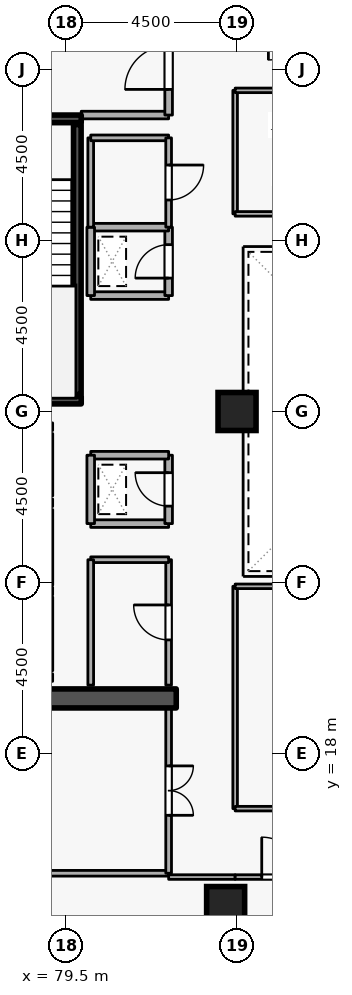
"""IFC4 building model, lengths in metres.
Left out: names, types, materials, properties, quantities, classifications, styles, units other than length and angle.
Written with IfcOpenShell. Run it as: python <this file> out.ifc"""

import sys

from ifc_helpers import new_model, si_unit, direction, frame, frame_2d, origin, origin_2d, place, context, subcontext, project, spatial, rectangle, extrude, element, fill, save


model = new_model("IFC4")
c1 = context("Model", 3, precision=1e-05, world=origin(), true_north=direction((0.0, 1.0)))
c2 = subcontext(c1, "Body", "Model", "MODEL_VIEW")
j1 = project(units=[si_unit("LENGTHUNIT", "METRE"), si_unit("PLANEANGLEUNIT", "RADIAN")], contexts=[c1])
p1 = place(None, origin())
s1 = spatial("IfcSite", under=j1, at=p1, CompositionType="ELEMENT")
p2 = place(p1, origin())
s2 = spatial("IfcBuilding", under=s1, at=p2, CompositionType="ELEMENT")
p3 = place(p2, frame((0.0, 0.0, 203.7)))
s3 = spatial("IfcBuildingStorey", under=s2, at=p3, CompositionType="ELEMENT", Elevation=203.7)
p4 = place(p3, frame((76.6, 19.45, 0.0), z_axis=(0.0, 0.0, 1.0), x_axis=(1.0, 0.0, 0.0)))
e1 = element("IfcWall", 1, at=p4, inside=s3, PredefinedType="SHEAR", context=c2, shape_type="SweptSolid", body=[
    extrude(rectangle(XDim=5.8, YDim=0.5, at=frame_2d((2.9, 0.0))), origin(), (0.0, 0.0, 1.0), 3.6),
])
for number, where, z_axis, x_axis in (
    (2, (83.7, 14.0, 0.0), (0.0, 0.0, 1.0), (1.0, 0.0, 0.0)),
    (3, (84.0, 27.0, 0.0), (0.0, 0.0, 1.0), (1.0, 0.0, 0.0)),
):
    element("IfcColumn", number, at=place(p3, frame(where, z_axis=z_axis, x_axis=x_axis)), inside=s3, PredefinedType="COLUMN", context=c2, shape_type="SweptSolid", body=[
        extrude(rectangle(XDim=1.0, YDim=1.0, at=origin_2d()), origin(), (0.0, 0.0, 1.0), 3.6),
    ])
p5 = place(p3, frame((79.05, 24.78, 0.0), z_axis=(0.0, 0.0, 1.0), x_axis=(0.0, 1.0, 0.0)))
e4 = element("IfcWall", 4, at=p5, inside=s3, PredefinedType="STANDARD", context=c2, shape_type="SweptSolid", body=[
    extrude(rectangle(XDim=1.64, YDim=0.2, at=frame_2d((0.82, 0.0))), origin(), (0.0, 0.0, 1.0), 3.34),
])
p6 = place(p5, frame((0.31, 0.0, 0.0)))
e5 = element("IfcOpeningElement", 5, at=p6, cuts=e4, PredefinedType="OPENING", context=c2, shape_type="SweptSolid", body=[
    extrude(rectangle(XDim=1.02, YDim=2.06, at=frame_2d((0.51, 1.03))), frame((0.0, 0.11, 0.0), z_axis=(0.0, -1.0, 0.0), x_axis=(1.0, 0.0, 0.0)), (0.0, 0.0, 1.0), 0.22),
])
p7 = place(p3, frame((79.05, 22.43, 0.0), z_axis=(0.0, 0.0, 1.0), x_axis=(0.0, 1.0, 0.0)))
e6 = element("IfcWall", 6, at=p7, inside=s3, PredefinedType="STANDARD", context=c2, shape_type="SweptSolid", body=[
    extrude(rectangle(XDim=1.99, YDim=0.2, at=frame_2d((0.995, 0.0))), origin(), (0.0, 0.0, 1.0), 3.34),
])
p8 = place(p7, frame((0.485, 0.0, 0.0)))
e7 = element("IfcOpeningElement", 7, at=p8, cuts=e6, PredefinedType="OPENING", context=c2, shape_type="SweptSolid", body=[
    extrude(rectangle(XDim=1.02, YDim=2.06, at=frame_2d((0.51, 1.03))), frame((0.0, 0.11, 0.0), z_axis=(0.0, -1.0, 0.0), x_axis=(1.0, 0.0, 0.0)), (0.0, 0.0, 1.0), 0.22),
])
p9 = place(p3, frame((79.05, 20.18, 0.0), z_axis=(0.0, 0.0, 1.0), x_axis=(0.0, 1.0, 0.0)))
e8 = element("IfcWall", 8, at=p9, inside=s3, PredefinedType="STANDARD", context=c2, shape_type="SweptSolid", body=[
    extrude(rectangle(XDim=1.94, YDim=0.2, at=frame_2d((0.97, 0.0))), origin(), (0.0, 0.0, 1.0), 3.34),
])
p10 = place(p9, frame((0.46, 0.0, 0.0)))
e9 = element("IfcOpeningElement", 9, at=p10, cuts=e8, PredefinedType="OPENING", context=c2, shape_type="SweptSolid", body=[
    extrude(rectangle(XDim=1.02, YDim=2.06, at=frame_2d((0.51, 1.03))), frame((0.0, 0.11, 0.0), z_axis=(0.0, -1.0, 0.0), x_axis=(1.0, 0.0, 0.0)), (0.0, 0.0, 1.0), 0.22),
])
p11 = place(p3, frame((76.55, 34.7, 0.0), z_axis=(0.0, 0.0, 1.0), x_axis=(1.0, 0.0, 0.0)))
e10 = element("IfcWall", 10, at=p11, inside=s3, PredefinedType="SHEAR", context=c2, shape_type="SweptSolid", body=[
    extrude(rectangle(XDim=3.35, YDim=0.2, at=frame_2d((1.675, 0.0))), origin(), (0.0, 0.0, 1.0), 3.6),
])
p12 = place(p11, frame((1.125, 0.0, 0.0)))
e11 = element("IfcOpeningElement", 11, at=p12, cuts=e10, PredefinedType="OPENING", context=c2, shape_type="SweptSolid", body=[
    extrude(rectangle(XDim=1.1, YDim=2.1, at=frame_2d((0.55, 1.05))), frame((0.0, 0.11, 0.0), z_axis=(0.0, -1.0, 0.0), x_axis=(1.0, 0.0, 0.0)), (0.0, 0.0, 1.0), 0.22),
])
p13 = place(p3, frame((79.9, 27.3, 0.0), z_axis=(0.0, 0.0, 1.0), x_axis=(-1.0, 0.0, 0.0)))
e12 = element("IfcWall", 12, at=p13, inside=s3, PredefinedType="SHEAR", context=c2, shape_type="SweptSolid", body=[
    extrude(rectangle(XDim=3.35, YDim=0.2, at=frame_2d((1.675, 0.0))), origin(), (0.0, 0.0, 1.0), 3.6),
])
p14 = place(p3, frame((79.797, 27.45, 0.0), z_axis=(0.0, 0.0, 1.0), x_axis=(0.0, 1.0, 0.0)))
e13 = element("IfcWall", 13, at=p14, inside=s3, PredefinedType="SHEAR", context=c2, shape_type="SweptSolid", body=[
    extrude(rectangle(XDim=7.1, YDim=0.2, at=frame_2d((3.55, 0.0))), origin(), (0.0, 0.0, 1.0), 3.6),
])
p15 = place(p3, frame((79.9, 34.8, 0.0), z_axis=(0.0, 0.0, 1.0), x_axis=(1.0, 0.0, 0.0)))
e14 = element("IfcWall", 14, at=p15, inside=s3, PredefinedType="STANDARD", context=c2, shape_type="SweptSolid", body=[
    extrude(rectangle(XDim=2.3, YDim=0.2, at=frame_2d((1.15, 0.0))), origin(), (0.0, 0.0, 1.0), 2.545),
])
p16 = place(p3, frame((82.2, 34.8, 0.0), z_axis=(0.0, 0.0, 1.0), x_axis=(0.0, 1.0, 0.0)))
e15 = element("IfcWall", 15, at=p16, inside=s3, PredefinedType="STANDARD", context=c2, shape_type="SweptSolid", body=[
    extrude(rectangle(XDim=2.5, YDim=0.2, at=frame_2d((1.25, 0.0))), origin(), (0.0, 0.0, 1.0), 3.34),
])
p17 = place(p16, frame((0.675, 0.0, 0.0)))
e16 = element("IfcOpeningElement", 16, at=p17, cuts=e15, PredefinedType="OPENING", context=c2, shape_type="SweptSolid", body=[
    extrude(rectangle(XDim=1.15, YDim=2.1, at=frame_2d((0.575, 1.05))), frame((0.0, 0.11, 0.0), z_axis=(0.0, -1.0, 0.0), x_axis=(1.0, 0.0, 0.0)), (0.0, 0.0, 1.0), 0.22),
])
p18 = place(p3, frame((80.15, 24.05, 0.0), z_axis=(0.0, 0.0, 1.0), x_axis=(1.0, 0.0, 0.0)))
e17 = element("IfcWall", 17, at=p18, inside=s3, PredefinedType="STANDARD", context=c2, shape_type="SweptSolid", body=[
    extrude(rectangle(XDim=2.05, YDim=0.2, at=frame_2d((1.025, 0.0))), origin(), (0.0, 0.0, 1.0), 3.34),
])
p19 = place(p3, frame((82.2, 24.05, 0.0), z_axis=(0.0, 0.0, 1.0), x_axis=(0.0, 1.0, 0.0)))
e18 = element("IfcWall", 18, at=p19, inside=s3, PredefinedType="STANDARD", context=c2, shape_type="SweptSolid", body=[
    extrude(rectangle(XDim=1.8, YDim=0.2, at=frame_2d((0.9, 0.0))), origin(), (0.0, 0.0, 1.0), 3.34),
])
p20 = place(p19, frame((0.46, 0.0, 0.0)))
e19 = element("IfcOpeningElement", 19, at=p20, cuts=e18, PredefinedType="OPENING", context=c2, shape_type="SweptSolid", body=[
    extrude(rectangle(XDim=0.88, YDim=2.04, at=frame_2d((0.44, 1.02))), frame((0.0, 0.11, 0.0), z_axis=(0.0, -1.0, 0.0), x_axis=(1.0, 0.0, 0.0)), (0.0, 0.0, 1.0), 0.22),
])
p21 = place(p3, frame((82.2, 25.85, 0.0), z_axis=(0.0, 0.0, 1.0), x_axis=(-1.0, 0.0, 0.0)))
e20 = element("IfcWall", 20, at=p21, inside=s3, PredefinedType="STANDARD", context=c2, shape_type="SweptSolid", body=[
    extrude(rectangle(XDim=2.05, YDim=0.2, at=frame_2d((1.025, 0.0))), origin(), (0.0, 0.0, 1.0), 3.34),
])
p22 = place(p3, frame((80.15, 25.85, 0.0), z_axis=(0.0, 0.0, 1.0), x_axis=(0.0, -1.0, 0.0)))
e21 = element("IfcWall", 21, at=p22, inside=s3, PredefinedType="STANDARD", context=c2, shape_type="SweptSolid", body=[
    extrude(rectangle(XDim=1.8, YDim=0.2, at=frame_2d((0.9, 0.0))), origin(), (0.0, 0.0, 1.0), 3.34),
])
p23 = place(p3, frame((80.15, 30.05, 0.0), z_axis=(0.0, 0.0, 1.0), x_axis=(1.0, 0.0, 0.0)))
e22 = element("IfcWall", 22, at=p23, inside=s3, PredefinedType="STANDARD", context=c2, shape_type="SweptSolid", body=[
    extrude(rectangle(XDim=2.05, YDim=0.2, at=frame_2d((1.025, 0.0))), origin(), (0.0, 0.0, 1.0), 3.34),
])
p24 = place(p3, frame((82.2, 30.05, 0.0), z_axis=(0.0, 0.0, 1.0), x_axis=(0.0, 1.0, 0.0)))
e23 = element("IfcWall", 23, at=p24, inside=s3, PredefinedType="STANDARD", context=c2, shape_type="SweptSolid", body=[
    extrude(rectangle(XDim=1.8, YDim=0.2, at=frame_2d((0.9, 0.0))), origin(), (0.0, 0.0, 1.0), 3.34),
])
p25 = place(p24, frame((0.46, 0.0, 0.0)))
e24 = element("IfcOpeningElement", 24, at=p25, cuts=e23, PredefinedType="OPENING", context=c2, shape_type="SweptSolid", body=[
    extrude(rectangle(XDim=0.88, YDim=2.04, at=frame_2d((0.44, 1.02))), frame((0.0, 0.11, 0.0), z_axis=(0.0, -1.0, 0.0), x_axis=(1.0, 0.0, 0.0)), (0.0, 0.0, 1.0), 0.22),
])
p26 = place(p3, frame((82.2, 31.85, 0.0), z_axis=(0.0, 0.0, 1.0), x_axis=(-1.0, 0.0, 0.0)))
e25 = element("IfcWall", 25, at=p26, inside=s3, PredefinedType="STANDARD", context=c2, shape_type="SweptSolid", body=[
    extrude(rectangle(XDim=2.05, YDim=0.2, at=frame_2d((1.025, 0.0))), origin(), (0.0, 0.0, 1.0), 3.34),
])
p27 = place(p3, frame((80.15, 31.85, 0.0), z_axis=(0.0, 0.0, 1.0), x_axis=(0.0, -1.0, 0.0)))
e26 = element("IfcWall", 26, at=p27, inside=s3, PredefinedType="STANDARD", context=c2, shape_type="SweptSolid", body=[
    extrude(rectangle(XDim=1.8, YDim=0.2, at=frame_2d((0.9, 0.0))), origin(), (0.0, 0.0, 1.0), 3.34),
])
p28 = place(p3, frame((82.2, 19.8, 0.0), z_axis=(0.0, 0.0, 1.0), x_axis=(0.0, 1.0, 0.0)))
e27 = element("IfcWall", 27, at=p28, inside=s3, PredefinedType="PARTITIONING", context=c2, shape_type="SweptSolid", body=[
    extrude(rectangle(XDim=3.3, YDim=0.15, at=frame_2d((1.65, 0.0))), origin(), (0.0, 0.0, 1.0), 3.34),
])
p29 = place(p28, frame((1.19, 0.0, 0.0)))
e28 = element("IfcOpeningElement", 28, at=p29, cuts=e27, PredefinedType="OPENING", context=c2, shape_type="SweptSolid", body=[
    extrude(rectangle(XDim=0.92, YDim=2.08, at=frame_2d((0.46, 1.04))), frame((0.0, 0.085, 0.0), z_axis=(0.0, -1.0, 0.0), x_axis=(1.0, 0.0, 0.0)), (0.0, 0.0, 1.0), 0.17),
])
p30 = place(p3, frame((82.2, 23.1, 0.0), z_axis=(0.0, 0.0, 1.0), x_axis=(-1.0, 0.0, 0.0)))
e29 = element("IfcWall", 29, at=p30, inside=s3, PredefinedType="PARTITIONING", context=c2, shape_type="SweptSolid", body=[
    extrude(rectangle(XDim=2.05, YDim=0.15, at=frame_2d((1.025, 0.0))), origin(), (0.0, 0.0, 1.0), 3.34),
])
p31 = place(p3, frame((80.15, 23.1, 0.0), z_axis=(0.0, 0.0, 1.0), x_axis=(0.0, -1.0, 0.0)))
e30 = element("IfcWall", 30, at=p31, inside=s3, PredefinedType="PARTITIONING", context=c2, shape_type="SweptSolid", body=[
    extrude(rectangle(XDim=3.3, YDim=0.15, at=frame_2d((1.65, 0.0))), origin(), (0.0, 0.0, 1.0), 3.34),
])
p32 = place(p3, frame((80.15, 31.85, 0.0), z_axis=(0.0, 0.0, 1.0), x_axis=(0.0, 1.0, 0.0)))
e31 = element("IfcWall", 31, at=p32, inside=s3, PredefinedType="PARTITIONING", context=c2, shape_type="SweptSolid", body=[
    extrude(rectangle(XDim=2.35, YDim=0.15, at=frame_2d((1.175, 0.0))), origin(), (0.0, 0.0, 1.0), 3.34),
])
p33 = place(p3, frame((80.15, 34.2, 0.0), z_axis=(0.0, 0.0, 1.0), x_axis=(1.0, 0.0, 0.0)))
e32 = element("IfcWall", 32, at=p33, inside=s3, PredefinedType="PARTITIONING", context=c2, shape_type="SweptSolid", body=[
    extrude(rectangle(XDim=2.05, YDim=0.15, at=frame_2d((1.025, 0.0))), origin(), (0.0, 0.0, 1.0), 2.545),
])
p34 = place(p3, frame((82.2, 34.2, 0.0), z_axis=(0.0, 0.0, 1.0), x_axis=(0.0, -1.0, 0.0)))
e33 = element("IfcWall", 33, at=p34, inside=s3, PredefinedType="PARTITIONING", context=c2, shape_type="SweptSolid", body=[
    extrude(rectangle(XDim=2.35, YDim=0.15, at=frame_2d((1.175, 0.0))), origin(), (0.0, 0.0, 1.0), 3.34),
])
p35 = place(p34, frame((0.715, 0.0, 0.0)))
e34 = element("IfcOpeningElement", 34, at=p35, cuts=e33, PredefinedType="OPENING", context=c2, shape_type="SweptSolid", body=[
    extrude(rectangle(XDim=0.92, YDim=2.08, at=frame_2d((0.46, 1.04))), frame((0.0, 0.085, 0.0), z_axis=(0.0, -1.0, 0.0), x_axis=(1.0, 0.0, 0.0)), (0.0, 0.0, 1.0), 0.17),
])
p36 = place(p3, frame((82.2, 14.85, 0.0), z_axis=(0.0, 0.0, 1.0), x_axis=(-1.0, 0.0, 0.0)))
e35 = element("IfcWall", 35, at=p36, inside=s3, PredefinedType="PARTITIONING", context=c2, shape_type="SweptSolid", body=[
    extrude(rectangle(XDim=17.42, YDim=0.15, at=frame_2d((8.71, 0.0))), origin(), (0.0, 0.0, 1.0), 3.34),
])
p37 = place(p3, frame((82.2, 19.2, 0.0), z_axis=(0.0, 0.0, 1.0), x_axis=(0.0, -1.0, 0.0)))
e36 = element("IfcWall", 36, at=p37, inside=s3, PredefinedType="PARTITIONING", context=c2, shape_type="SweptSolid", body=[
    extrude(rectangle(XDim=4.35, YDim=0.15, at=frame_2d((2.175, 0.0))), origin(), (0.0, 0.0, 1.0), 3.34),
])
p38 = place(p37, frame((1.525, 0.0, 0.0)))
e37 = element("IfcOpeningElement", 37, at=p38, cuts=e36, PredefinedType="OPENING", context=c2, shape_type="SweptSolid", body=[
    extrude(rectangle(XDim=1.3, YDim=2.12, at=frame_2d((0.65, 1.06))), frame((0.0, 0.085, 0.0), z_axis=(0.0, -1.0, 0.0), x_axis=(1.0, 0.0, 0.0)), (0.0, 0.0, 1.0), 0.17),
])
p39 = place(p3, frame((82.2, 14.75, 0.0), z_axis=(0.0, 0.0, 1.0), x_axis=(1.0, 0.0, 0.0)))
e38 = element("IfcWall", 38, at=p39, inside=s3, PredefinedType="PARTITIONING", context=c2, shape_type="SweptSolid", body=[
    extrude(rectangle(XDim=1.75, YDim=0.12, at=frame_2d((0.875, 0.0))), origin(), (0.0, 0.0, 1.0), 3.34),
])
p40 = place(p3, frame((83.95, 14.75, 0.0), z_axis=(0.0, 0.0, 1.0), x_axis=(1.0, 0.0, 0.0)))
e39 = element("IfcWall", 39, at=p40, inside=s3, PredefinedType="PARTITIONING", context=c2, shape_type="SweptSolid", body=[
    extrude(rectangle(XDim=2.45, YDim=0.12, at=frame_2d((1.225, 0.0))), origin(), (0.0, 0.0, 1.0), 3.34),
])
p41 = place(p40, frame((0.7, 0.0, 0.0)))
e40 = element("IfcOpeningElement", 40, at=p41, cuts=e39, PredefinedType="OPENING", context=c2, shape_type="SweptSolid", body=[
    extrude(rectangle(XDim=1.05, YDim=2.1, at=frame_2d((0.525, 1.05))), frame((0.0, 0.07, 0.0), z_axis=(0.0, -1.0, 0.0), x_axis=(1.0, 0.0, 0.0)), (0.0, 0.0, 1.0), 0.14),
])
p42 = place(p3, frame((83.95, 16.55, 0.0), z_axis=(0.0, 0.0, 1.0), x_axis=(0.0, 1.0, 0.0)))
e41 = element("IfcWall", 41, at=p42, inside=s3, PredefinedType="PARTITIONING", context=c2, shape_type="SweptSolid", body=[
    extrude(rectangle(XDim=5.85, YDim=0.12, at=frame_2d((2.925, 0.0))), origin(), (0.0, 0.0, 1.0), 3.34),
])
p43 = place(p3, frame((83.95, 22.4, 0.0), z_axis=(0.0, 0.0, 1.0), x_axis=(1.0, 0.0, 0.0)))
e42 = element("IfcWall", 42, at=p43, inside=s3, PredefinedType="PARTITIONING", context=c2, shape_type="SweptSolid", body=[
    extrude(rectangle(XDim=9.1, YDim=0.12, at=frame_2d((4.55, 0.0))), origin(), (0.0, 0.0, 1.0), 3.34),
])
p44 = place(p3, frame((93.05, 16.55, 0.0), z_axis=(0.0, 0.0, 1.0), x_axis=(-1.0, 0.0, 0.0)))
e43 = element("IfcWall", 43, at=p44, inside=s3, PredefinedType="PARTITIONING", context=c2, shape_type="SweptSolid", body=[
    extrude(rectangle(XDim=9.1, YDim=0.12, at=frame_2d((4.55, 0.0))), origin(), (0.0, 0.0, 1.0), 3.34),
])
p45 = place(p44, frame((4.075, 0.0, 0.0)))
e44 = element("IfcOpeningElement", 44, at=p45, cuts=e43, PredefinedType="OPENING", context=c2, shape_type="SweptSolid", body=[
    extrude(rectangle(XDim=0.95, YDim=2.1, at=frame_2d((0.475, 1.05))), frame((0.0, 0.07, 0.0), z_axis=(0.0, -1.0, 0.0), x_axis=(1.0, 0.0, 0.0)), (0.0, 0.0, 1.0), 0.14),
])
p46 = place(p3, frame((83.95, 32.2, 0.0), z_axis=(0.0, 0.0, 1.0), x_axis=(0.0, 1.0, 0.0)))
e45 = element("IfcWall", 45, at=p46, inside=s3, PredefinedType="PARTITIONING", context=c2, shape_type="SweptSolid", body=[
    extrude(rectangle(XDim=3.25, YDim=0.12, at=frame_2d((1.625, 0.0))), origin(), (0.0, 0.0, 1.0), 3.34),
])
p47 = place(p3, frame((83.95, 35.45, 0.0), z_axis=(0.0, 0.0, 1.0), x_axis=(1.0, 0.0, 0.0)))
e46 = element("IfcWall", 46, at=p47, inside=s3, PredefinedType="PARTITIONING", context=c2, shape_type="SweptSolid", body=[
    extrude(rectangle(XDim=9.1, YDim=0.12, at=frame_2d((4.55, 0.0))), origin(), (0.0, 0.0, 1.0), 3.34),
])
p48 = place(p47, frame((4.075, 0.0, 0.0)))
e47 = element("IfcOpeningElement", 47, at=p48, cuts=e46, PredefinedType="OPENING", context=c2, shape_type="SweptSolid", body=[
    extrude(rectangle(XDim=0.95, YDim=2.1, at=frame_2d((0.475, 1.05))), frame((0.0, 0.07, 0.0), z_axis=(0.0, -1.0, 0.0), x_axis=(1.0, 0.0, 0.0)), (0.0, 0.0, 1.0), 0.14),
])
p49 = place(p3, frame((93.05, 32.2, 0.0), z_axis=(0.0, 0.0, 1.0), x_axis=(-1.0, 0.0, 0.0)))
e48 = element("IfcWall", 48, at=p49, inside=s3, PredefinedType="PARTITIONING", context=c2, shape_type="SweptSolid", body=[
    extrude(rectangle(XDim=9.1, YDim=0.12, at=frame_2d((4.55, 0.0))), origin(), (0.0, 0.0, 1.0), 3.34),
])
p50 = place(p17, origin())
e49 = element("IfcDoor", 49, at=p50, inside=s3, OperationType="SINGLE_SWING_LEFT", PredefinedType="DOOR", context=c2, shape_type="SweptSolid", body=[
    extrude(rectangle(XDim=1.15, YDim=2.1, at=frame_2d((0.575, 1.05))), frame((0.0, 0.025, 0.0), z_axis=(0.0, -1.0, 0.0), x_axis=(1.0, 0.0, 0.0)), (0.0, 0.0, 1.0), 0.05),
])
fill(e16, e49)
p51 = place(p20, origin())
e50 = element("IfcDoor", 50, at=p51, inside=s3, OperationType="SINGLE_SWING_RIGHT", PredefinedType="DOOR", context=c2, shape_type="SweptSolid", body=[
    extrude(rectangle(XDim=0.88, YDim=2.04, at=frame_2d((0.44, 1.02))), frame((0.0, 0.025, 0.0), z_axis=(0.0, -1.0, 0.0), x_axis=(1.0, 0.0, 0.0)), (0.0, 0.0, 1.0), 0.05),
])
fill(e19, e50)
p52 = place(p25, origin())
e51 = element("IfcDoor", 51, at=p52, inside=s3, OperationType="SINGLE_SWING_LEFT", PredefinedType="DOOR", context=c2, shape_type="SweptSolid", body=[
    extrude(rectangle(XDim=0.88, YDim=2.04, at=frame_2d((0.44, 1.02))), frame((0.0, 0.025, 0.0), z_axis=(0.0, -1.0, 0.0), x_axis=(1.0, 0.0, 0.0)), (0.0, 0.0, 1.0), 0.05),
])
fill(e24, e51)
p53 = place(p29, origin())
e52 = element("IfcDoor", 52, at=p53, inside=s3, OperationType="SINGLE_SWING_RIGHT", PredefinedType="DOOR", context=c2, shape_type="SweptSolid", body=[
    extrude(rectangle(XDim=0.92, YDim=2.08, at=frame_2d((0.46, 1.04))), frame((0.0, 0.025, 0.0), z_axis=(0.0, -1.0, 0.0), x_axis=(1.0, 0.0, 0.0)), (0.0, 0.0, 1.0), 0.05),
])
fill(e28, e52)
p54 = place(p35, origin())
e53 = element("IfcDoor", 53, at=p54, inside=s3, OperationType="SINGLE_SWING_LEFT", PredefinedType="DOOR", context=c2, shape_type="SweptSolid", body=[
    extrude(rectangle(XDim=0.92, YDim=2.08, at=frame_2d((0.46, 1.04))), frame((0.0, 0.025, 0.0), z_axis=(0.0, -1.0, 0.0), x_axis=(1.0, 0.0, 0.0)), (0.0, 0.0, 1.0), 0.05),
])
fill(e34, e53)
p55 = place(p38, origin())
e54 = element("IfcDoor", 54, at=p55, inside=s3, OperationType="DOUBLE_DOOR_SINGLE_SWING", PredefinedType="DOOR", context=c2, shape_type="SweptSolid", body=[
    extrude(rectangle(XDim=1.3, YDim=2.12, at=frame_2d((0.65, 1.06))), frame((0.0, 0.025, 0.0), z_axis=(0.0, -1.0, 0.0), x_axis=(1.0, 0.0, 0.0)), (0.0, 0.0, 1.0), 0.05),
])
fill(e37, e54)
p56 = place(p41, origin())
e55 = element("IfcDoor", 55, at=p56, inside=s3, OperationType="SINGLE_SWING_LEFT", PredefinedType="DOOR", context=c2, shape_type="SweptSolid", body=[
    extrude(rectangle(XDim=1.05, YDim=2.1, at=frame_2d((0.525, 1.05))), frame((0.0, 0.025, 0.0), z_axis=(0.0, -1.0, 0.0), x_axis=(1.0, 0.0, 0.0)), (0.0, 0.0, 1.0), 0.05),
])
fill(e40, e55)
save(model, sys.argv[1])
